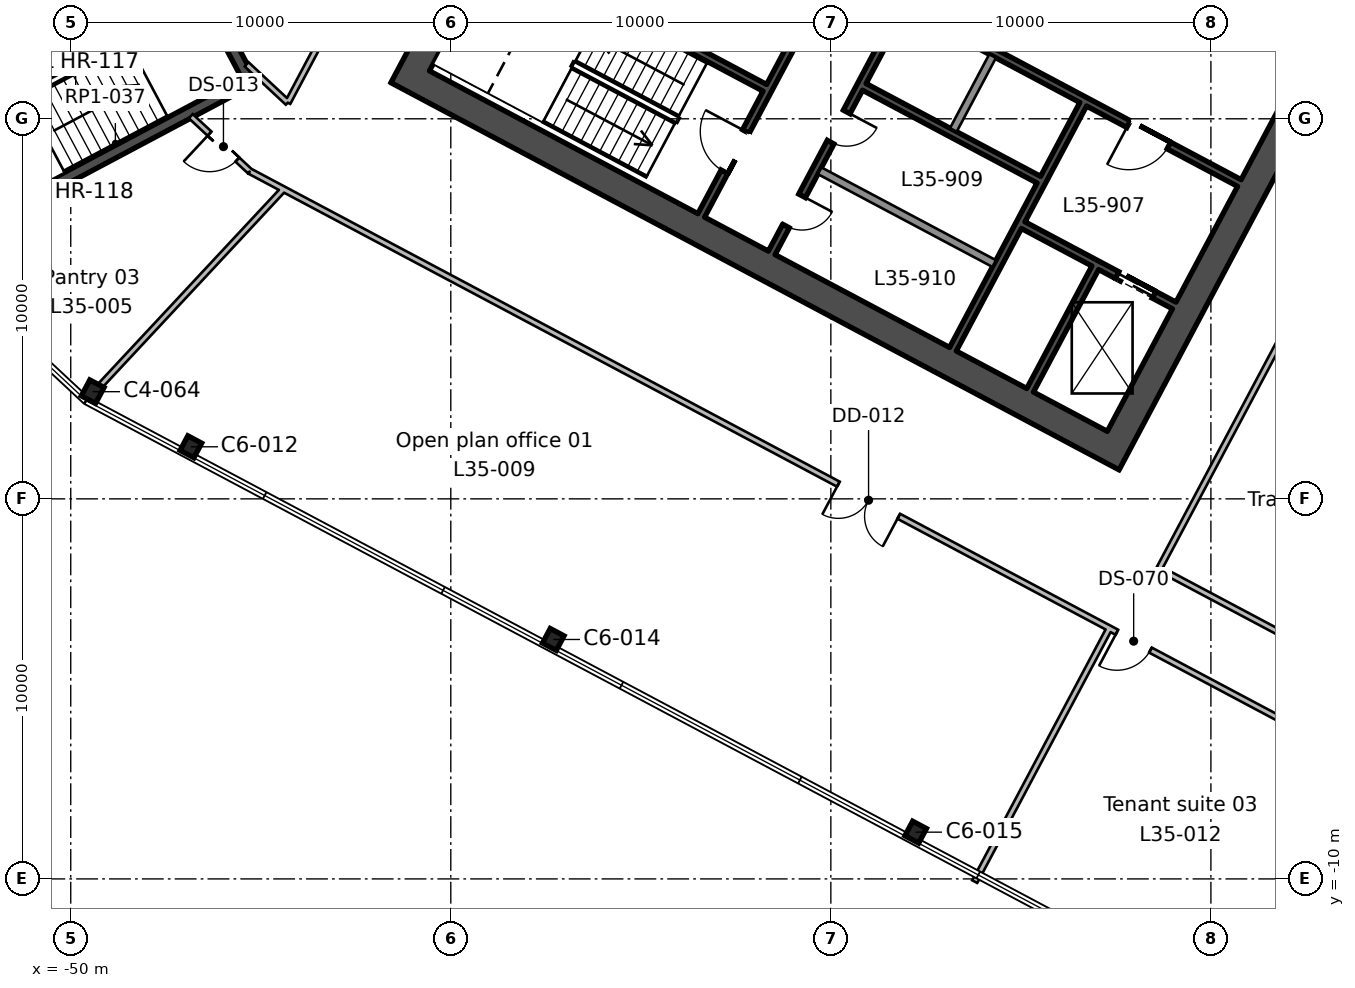
"""IFC4 building model, lengths in metres.
Left out: names, types, materials, properties, quantities, classifications, styles, units other than length and angle.
Written with IfcOpenShell. Run it as: python <this file> out.ifc"""

import sys

from ifc_helpers import new_model, si_unit, direction, frame, frame_2d, origin, origin_2d, place, context, subcontext, project, spatial, rectangle, i_section, extrude, element, fill, save


model = new_model("IFC4")
c1 = context("Model", 3, precision=1e-05, world=origin(), true_north=direction((0.0, 1.0)))
c2 = subcontext(c1, "Body", "Model", "MODEL_VIEW")
j1 = project(units=[si_unit("LENGTHUNIT", "METRE"), si_unit("PLANEANGLEUNIT", "RADIAN")], contexts=[c1])
p1 = place(None, origin())
s1 = spatial("IfcSite", under=j1, at=p1, CompositionType="ELEMENT")
p2 = place(p1, origin())
s2 = spatial("IfcBuilding", under=s1, at=p2, CompositionType="ELEMENT")
p3 = place(p2, frame((0.0, 0.0, 166.2)))
s3 = spatial("IfcBuildingStorey", under=s2, at=p3, CompositionType="ELEMENT", Elevation=166.2)
for number, where, z_axis, x_axis in (
    (1, (-27.768, -8.77, 0.0), (0.0, 0.0, 1.0), (0.883, -0.469, 0.0)),
    (2, (-37.304, -3.7, 0.0), (0.0, 0.0, 1.0), (0.883, -0.469, 0.0)),
    (3, (-46.839, 1.37, 0.0), (0.0, 0.0, 1.0), (0.883, -0.469, 0.0)),
):
    element("IfcColumn", number, at=place(p3, frame(where, z_axis=z_axis, x_axis=x_axis)), inside=s3, PredefinedType="COLUMN", context=c2, shape_type="SweptSolid", body=[
        extrude(i_section(OverallWidth=0.412, OverallDepth=0.434, WebThickness=0.036, FlangeThickness=0.057, FilletRadius=0.015, at=origin_2d()), origin(), (0.0, 0.0, 1.0), 4.0),
    ])
p4 = place(p3, frame((-49.423, 2.82, 0.0), z_axis=(0.0, 0.0, 1.0), x_axis=(0.882947592859, -0.469471562786, 0.0)))
e4 = element("IfcColumn", 4, at=p4, inside=s3, PredefinedType="COLUMN", context=c2, shape_type="SweptSolid", body=[
    extrude(i_section(OverallWidth=0.424, OverallDepth=0.475, WebThickness=0.048, FlangeThickness=0.077, FilletRadius=0.015, at=origin_2d()), origin(), (0.0, 0.0, 1.0), 4.0),
])
p5 = place(p3, frame((-13.498, 18.333, 0.0), z_axis=(0.0, 0.0, 1.0), x_axis=(-0.469469918705, -0.88294846703, 0.0)))
e5 = element("IfcWall", 5, at=p5, inside=s3, PredefinedType="SHEAR", context=c2, shape_type="SweptSolid", body=[
    extrude(rectangle(XDim=19.7, YDim=0.75, at=frame_2d((9.85, 0.0))), origin(), (0.0, 0.0, 1.0), 4.0),
])
p6 = place(p5, frame((6.85, 0.0, 0.0)))
e6 = element("IfcOpeningElement", 6, at=p6, cuts=e5, PredefinedType="OPENING", context=c2, shape_type="SweptSolid", body=[
    extrude(rectangle(XDim=2.4, YDim=2.4, at=frame_2d((1.2, 1.2))), frame((0.0, 0.385, 0.0), z_axis=(0.0, -1.0, 0.0), x_axis=(1.0, 0.0, 0.0)), (0.0, 0.0, 1.0), 0.77),
])
p7 = place(p3, frame((-31.996, 28.168, 0.0), z_axis=(0.0, 0.0, 1.0), x_axis=(-0.469479580143, -0.882943329908, 0.0)))
e7 = element("IfcWall", 7, at=p7, inside=s3, PredefinedType="SHEAR", context=c2, shape_type="SweptSolid", body=[
    extrude(rectangle(XDim=19.7, YDim=0.75, at=frame_2d((9.85, 0.0))), origin(), (0.0, 0.0, 1.0), 4.0),
])
p8 = place(p7, frame((10.45, 0.0, 0.0)))
e8 = element("IfcOpeningElement", 8, at=p8, cuts=e7, PredefinedType="OPENING", context=c2, shape_type="SweptSolid", body=[
    extrude(rectangle(XDim=2.4, YDim=2.4, at=frame_2d((1.2, 1.2))), frame((0.0, 0.385, 0.0), z_axis=(0.0, -1.0, 0.0), x_axis=(1.0, 0.0, 0.0)), (0.0, 0.0, 1.0), 0.77),
])
p9 = place(p3, frame((-22.902, 1.446, 0.0), z_axis=(0.0, 0.0, 1.0), x_axis=(-0.88294509198, 0.469476266226, 0.0)))
e9 = element("IfcWall", 9, at=p9, inside=s3, PredefinedType="SHEAR", context=c2, shape_type="SweptSolid", body=[
    extrude(rectangle(XDim=20.2, YDim=0.75, at=frame_2d((10.1, 0.0))), origin(), (0.0, 0.0, 1.0), 4.0),
])
p10 = place(p3, frame((-23.043, 6.08, 0.0), z_axis=(0.0, 0.0, 1.0), x_axis=(-0.469494272526, -0.882935517501, 0.0)))
e10 = element("IfcWall", 10, at=p10, inside=s3, PredefinedType="SHEAR", context=c2, shape_type="SweptSolid", body=[
    extrude(rectangle(XDim=3.65, YDim=0.2, at=frame_2d((1.825, 0.0))), origin(), (0.0, 0.0, 1.0), 4.0),
])
p11 = place(p3, frame((-23.36, 10.382, 0.0), z_axis=(0.0, 0.0, 1.0), x_axis=(-0.469480409012, -0.88294288918, 0.0)))
e11 = element("IfcWall", 11, at=p11, inside=s3, PredefinedType="SHEAR", context=c2, shape_type="SweptSolid", body=[
    extrude(rectangle(XDim=7.3, YDim=0.2, at=frame_2d((3.65, 0.0))), origin(), (0.0, 0.0, 1.0), 4.0),
])
p12 = place(p3, frame((-25.744, 11.65, 0.0), z_axis=(0.0, 0.0, 1.0), x_axis=(-0.469487830541, -0.882938942948, 0.0)))
e12 = element("IfcWall", 12, at=p12, inside=s3, PredefinedType="SOLIDWALL", context=c2, shape_type="SweptSolid", body=[
    extrude(rectangle(XDim=2.2, YDim=0.2, at=frame_2d((1.1, 0.0))), origin(), (0.0, 0.0, 1.0), 4.0),
])
p13 = place(p3, frame((-28.128, 12.917, 0.0), z_axis=(0.0, 0.0, 1.0), x_axis=(-0.469454336211, -0.882956752176, 0.0)))
e13 = element("IfcWall", 13, at=p13, inside=s3, PredefinedType="SHEAR", context=c2, shape_type="SweptSolid", body=[
    extrude(rectangle(XDim=7.3, YDim=0.2, at=frame_2d((3.65, 0.0))), origin(), (0.0, 0.0, 1.0), 4.0),
])
p14 = place(p13, frame((3.1, 0.0, 0.0)))
e14 = element("IfcOpeningElement", 14, at=p14, cuts=e13, PredefinedType="OPENING", context=c2, shape_type="SweptSolid", body=[
    extrude(rectangle(XDim=0.9, YDim=2.1, at=frame_2d((0.45, 1.05))), frame((0.0, 0.11, 0.0), z_axis=(0.0, -1.0, 0.0), x_axis=(1.0, 0.0, 0.0)), (0.0, 0.0, 1.0), 0.22),
])
p15 = place(p13, frame((5.6, 0.0, 0.0)))
e15 = element("IfcOpeningElement", 15, at=p15, cuts=e13, PredefinedType="OPENING", context=c2, shape_type="SweptSolid", body=[
    extrude(rectangle(XDim=0.9, YDim=2.1, at=frame_2d((0.45, 1.05))), frame((0.0, 0.11, 0.0), z_axis=(0.0, -1.0, 0.0), x_axis=(1.0, 0.0, 0.0)), (0.0, 0.0, 1.0), 0.22),
])
p16 = place(p3, frame((-29.982, 13.903, 0.0), z_axis=(0.0, 0.0, 1.0), x_axis=(-0.469454336211, -0.882956752176, 0.0)))
e16 = element("IfcWall", 16, at=p16, inside=s3, PredefinedType="SHEAR", context=c2, shape_type="SweptSolid", body=[
    extrude(rectangle(XDim=7.3, YDim=0.2, at=frame_2d((3.65, 0.0))), origin(), (0.0, 0.0, 1.0), 4.0),
])
p17 = place(p16, frame((4.8, 0.0, 0.0)))
e17 = element("IfcOpeningElement", 17, at=p17, cuts=e16, PredefinedType="OPENING", context=c2, shape_type="SweptSolid", body=[
    extrude(rectangle(XDim=1.2, YDim=2.1, at=frame_2d((0.6, 1.05))), frame((0.0, 0.11, 0.0), z_axis=(0.0, -1.0, 0.0), x_axis=(1.0, 0.0, 0.0)), (0.0, 0.0, 1.0), 0.22),
])
p18 = place(p3, frame((-19.252, 8.311, 0.0), z_axis=(0.0, 0.0, 1.0), x_axis=(-0.882955722218, 0.469456273365, 0.0)))
e18 = element("IfcWall", 18, at=p18, inside=s3, PredefinedType="SHEAR", context=c2, shape_type="SweptSolid", body=[
    extrude(rectangle(XDim=10.0, YDim=0.2, at=frame_2d((5.0, 0.0))), origin(), (0.0, 0.0, 1.0), 4.0),
])
p19 = place(p18, frame((2.1, 0.0, 0.0)))
e19 = element("IfcOpeningElement", 19, at=p19, cuts=e18, PredefinedType="OPENING", context=c2, shape_type="SweptSolid", body=[
    extrude(rectangle(XDim=1.2, YDim=2.1, at=frame_2d((0.6, 1.05))), frame((0.0, 0.11, 0.0), z_axis=(0.0, -1.0, 0.0), x_axis=(1.0, 0.0, 0.0)), (0.0, 0.0, 1.0), 0.22),
])
p20 = place(p3, frame((-24.528, 8.398, 0.0), z_axis=(0.0, 0.0, 1.0), x_axis=(-0.882953967957, 0.469459572775, 0.0)))
e20 = element("IfcWall", 20, at=p20, inside=s3, PredefinedType="SHEAR", context=c2, shape_type="SweptSolid", body=[
    extrude(rectangle(XDim=5.2, YDim=0.2, at=frame_2d((2.6, 0.0))), origin(), (0.0, 0.0, 1.0), 4.0),
])
p21 = place(p3, frame((-20.965, 5.088, 0.0), z_axis=(0.0, 0.0, 1.0), x_axis=(-0.882925986334, 0.469512196493, 0.0)))
e21 = element("IfcWall", 21, at=p21, inside=s3, PredefinedType="SHEAR", context=c2, shape_type="SweptSolid", body=[
    extrude(rectangle(XDim=4.5, YDim=0.2, at=frame_2d((2.25, 0.0))), origin(), (0.0, 0.0, 1.0), 4.0),
])
p22 = place(p21, frame((0.6, 0.0, 0.0)))
e22 = element("IfcOpeningElement", 22, at=p22, cuts=e21, PredefinedType="OPENING", context=c2, shape_type="SweptSolid", body=[
    extrude(rectangle(XDim=1.1, YDim=2.1, at=frame_2d((0.55, 1.05))), frame((0.0, 0.11, 0.0), z_axis=(0.0, -1.0, 0.0), x_axis=(1.0, 0.0, 0.0)), (0.0, 0.0, 1.0), 0.22),
])
p23 = place(p3, frame((-31.737, 10.816, 0.0), z_axis=(0.0, 0.0, 1.0), x_axis=(-0.882940221191, 0.469485426614, 0.0)))
e23 = element("IfcWall", 23, at=p23, inside=s3, PredefinedType="SHEAR", context=c2, shape_type="SweptSolid", body=[
    extrude(rectangle(XDim=8.0, YDim=0.2, at=frame_2d((4.0, 0.0))), origin(), (0.0, 0.0, 1.0), 4.0),
])
p24 = place(p3, frame((-25.702, 6.191, 0.0), z_axis=(0.0, 0.0, 1.0), x_axis=(-0.882934506056, 0.469496174655, 0.0)))
e24 = element("IfcWall", 24, at=p24, inside=s3, PredefinedType="SOLIDWALL", context=c2, shape_type="SweptSolid", body=[
    extrude(rectangle(XDim=5.2, YDim=0.2, at=frame_2d((2.6, 0.0))), origin(), (0.0, 0.0, 1.0), 4.0),
])
p25 = place(p3, frame((-47.574, 15.29, 0.0), z_axis=(0.0, 0.0, 1.0), x_axis=(0.469443498566, -0.882962514297, 0.0)))
e25 = element("IfcWall", 25, at=p25, inside=s3, PredefinedType="SHEAR", context=c2, shape_type="SweptSolid", body=[
    extrude(rectangle(XDim=4.85, YDim=0.3, at=frame_2d((2.425, 0.0))), origin(), (0.0, 0.0, 1.0), 4.0),
])
p26 = place(p3, frame((-45.297, 11.007, 0.0), z_axis=(0.0, 0.0, 1.0), x_axis=(-0.882951519127, -0.469464178475, 0.0)))
e26 = element("IfcWall", 26, at=p26, inside=s3, PredefinedType="SHEAR", context=c2, shape_type="SweptSolid", body=[
    extrude(rectangle(XDim=8.3, YDim=0.3, at=frame_2d((4.15, 0.0))), origin(), (0.0, 0.0, 1.0), 4.0),
])
p27 = place(p3, frame((-54.903, 11.393, 0.0), z_axis=(0.0, 0.0, 1.0), x_axis=(0.882939326045, 0.469487110071, 0.0)))
e27 = element("IfcWall", 27, at=p27, inside=s3, PredefinedType="SHEAR", context=c2, shape_type="SweptSolid", body=[
    extrude(rectangle(XDim=8.3, YDim=0.3, at=frame_2d((4.15, 0.0))), origin(), (0.0, 0.0, 1.0), 4.0),
])
p28 = place(p27, frame((6.05, 0.0, 0.0)))
e28 = element("IfcOpeningElement", 28, at=p28, cuts=e27, PredefinedType="OPENING", context=c2, shape_type="SweptSolid", body=[
    extrude(rectangle(XDim=1.9, YDim=2.1, at=frame_2d((0.95, 1.05))), frame((0.0, 0.16, 0.0), z_axis=(0.0, -1.0, 0.0), x_axis=(1.0, 0.0, 0.0)), (0.0, 0.0, 1.0), 0.32),
])
p29 = place(p3, frame((-44.402, 8.149, 0.0), z_axis=(0.0, 0.0, 1.0), x_axis=(-0.682039957921, -0.731314908777, 0.0)))
e29 = element("IfcWall", 29, at=p29, inside=s3, PredefinedType="PARTITIONING", context=c2, shape_type="SweptSolid", body=[
    extrude(rectangle(XDim=7.065, YDim=0.15, at=frame_2d((3.533, 0.0))), origin(), (0.0, 0.0, 1.0), 3.64),
])
p30 = place(p3, frame((-22.67, -3.406, 0.0), z_axis=(0.0, 0.0, 1.0), x_axis=(-0.469451537303, -0.882958240306, 0.0)))
e30 = element("IfcWall", 30, at=p30, inside=s3, PredefinedType="PARTITIONING", context=c2, shape_type="SweptSolid", body=[
    extrude(rectangle(XDim=7.55, YDim=0.15, at=frame_2d((3.775, 0.0))), origin(), (0.0, 0.0, 1.0), 3.64),
])
p31 = place(p3, frame((-33.409, 30.888, 0.0), z_axis=(0.0, 0.0, 1.0), x_axis=(-0.469498189487, -0.882933434676, 0.0)))
e31 = element("IfcWall", 31, at=p31, inside=s3, PredefinedType="PARTITIONING", context=c2, shape_type="SweptSolid", body=[
    extrude(rectangle(XDim=23.176, YDim=0.15, at=frame_2d((11.588, 0.0))), origin(), (0.0, 0.0, 1.0), 3.64),
])
p32 = place(p3, frame((-44.29, 10.425, 0.0), z_axis=(0.0, 0.0, 1.0), x_axis=(-0.731652828982, 0.681677444135, 0.0)))
e32 = element("IfcWall", 32, at=p32, inside=s3, PredefinedType="PARTITIONING", context=c2, shape_type="SweptSolid", body=[
    extrude(rectangle(XDim=1.48, YDim=0.15, at=frame_2d((0.74, 0.0))), origin(), (0.0, 0.0, 1.0), 3.64),
])
p33 = place(p3, frame((-44.462, 8.181, 0.0), z_axis=(0.0, 0.0, 1.0), x_axis=(-0.882750253305, 0.469842516478, 0.0)))
e33 = element("IfcWall", 33, at=p33, inside=s3, PredefinedType="PARTITIONING", context=c2, shape_type="SweptSolid", body=[
    extrude(rectangle(XDim=0.935, YDim=0.15, at=frame_2d((0.467, 0.0))), origin(), (0.0, 0.0, 1.0), 3.64),
])
p34 = place(p3, frame((-45.287, 8.62, 0.0), z_axis=(0.0, 0.0, 1.0), x_axis=(-0.731593637228, 0.681740969846, 0.0)))
e34 = element("IfcWall", 34, at=p34, inside=s3, PredefinedType="PARTITIONING", context=c2, shape_type="SweptSolid", body=[
    extrude(rectangle(XDim=2.125, YDim=0.15, at=frame_2d((1.063, 0.0))), origin(), (0.0, 0.0, 1.0), 3.64),
])
p35 = place(p34, frame((0.45, 0.0, 0.0)))
e35 = element("IfcOpeningElement", 35, at=p35, cuts=e34, PredefinedType="OPENING", context=c2, shape_type="SweptSolid", body=[
    extrude(rectangle(XDim=1.0, YDim=2.1, at=frame_2d((0.5, 1.05))), frame((0.0, 0.085, 0.0), z_axis=(0.0, -1.0, 0.0), x_axis=(1.0, 0.0, 0.0)), (0.0, 0.0, 1.0), 0.17),
])
p36 = place(p3, frame((-13.6, -8.228, 0.0), z_axis=(0.0, 0.0, 1.0), x_axis=(-0.882954510497, 0.469458552369, 0.0)))
e36 = element("IfcWall", 36, at=p36, inside=s3, PredefinedType="PARTITIONING", context=c2, shape_type="SweptSolid", body=[
    extrude(rectangle(XDim=34.953, YDim=0.15, at=frame_2d((17.477, 0.0))), origin(), (0.0, 0.0, 1.0), 3.64),
])
p37 = place(p36, frame((16.55, 0.0, 0.0)))
e37 = element("IfcOpeningElement", 37, at=p37, cuts=e36, PredefinedType="OPENING", context=c2, shape_type="SweptSolid", body=[
    extrude(rectangle(XDim=1.8, YDim=2.1, at=frame_2d((0.9, 1.05))), frame((0.0, 0.085, 0.0), z_axis=(0.0, -1.0, 0.0), x_axis=(1.0, 0.0, 0.0)), (0.0, 0.0, 1.0), 0.17),
])
p38 = place(p36, frame((9.05, 0.0, 0.0)))
e38 = element("IfcOpeningElement", 38, at=p38, cuts=e36, PredefinedType="OPENING", context=c2, shape_type="SweptSolid", body=[
    extrude(rectangle(XDim=1.0, YDim=2.1, at=frame_2d((0.5, 1.05))), frame((0.0, 0.085, 0.0), z_axis=(0.0, -1.0, 0.0), x_axis=(1.0, 0.0, 0.0)), (0.0, 0.0, 1.0), 0.17),
])
p39 = place(p3, frame((-21.362, -1.836, 0.0), z_axis=(0.0, 0.0, 1.0), x_axis=(0.469442492633, 0.88296304912, 0.0)))
e39 = element("IfcWall", 39, at=p39, inside=s3, PredefinedType="PARTITIONING", context=c2, shape_type="SweptSolid", body=[
    extrude(rectangle(XDim=23.3, YDim=0.15, at=frame_2d((11.65, 0.0))), origin(), (0.0, 0.0, 1.0), 3.64),
])
p40 = place(p39, frame((11.15, 0.0, 0.0)))
e40 = element("IfcOpeningElement", 40, at=p40, cuts=e39, PredefinedType="OPENING", context=c2, shape_type="SweptSolid", body=[
    extrude(rectangle(XDim=1.0, YDim=2.1, at=frame_2d((0.5, 1.05))), frame((0.0, 0.085, 0.0), z_axis=(0.0, -1.0, 0.0), x_axis=(1.0, 0.0, 0.0)), (0.0, 0.0, 1.0), 0.17),
])
p41 = place(p3, frame((-13.6, -5.963, 0.0), z_axis=(0.0, 0.0, 1.0), x_axis=(-0.882954936964, 0.469457750273, 0.0)))
e41 = element("IfcWall", 41, at=p41, inside=s3, PredefinedType="PARTITIONING", context=c2, shape_type="SweptSolid", body=[
    extrude(rectangle(XDim=8.791, YDim=0.15, at=frame_2d((4.396, 0.0))), origin(), (0.0, 0.0, 1.0), 3.64),
])
p42 = place(p19, origin())
e42 = element("IfcDoor", 42, at=p42, inside=s3, OperationType="SINGLE_SWING_RIGHT", PredefinedType="DOOR", context=c2, shape_type="SweptSolid", body=[
    extrude(rectangle(XDim=1.2, YDim=2.1, at=frame_2d((0.6, 1.05))), frame((0.0, 0.025, 0.0), z_axis=(0.0, -1.0, 0.0), x_axis=(1.0, 0.0, 0.0)), (0.0, 0.0, 1.0), 0.05),
])
fill(e19, e42)
p43 = place(p17, frame((1.2, 0.0, 0.0), z_axis=(0.0, 0.0, 1.0), x_axis=(-1.0, 0.0, 0.0)))
e43 = element("IfcDoor", 43, at=p43, inside=s3, OperationType="SINGLE_SWING_RIGHT", PredefinedType="DOOR", context=c2, shape_type="SweptSolid", body=[
    extrude(rectangle(XDim=1.2, YDim=2.1, at=frame_2d((0.6, 1.05))), frame((0.0, 0.025, 0.0), z_axis=(0.0, -1.0, 0.0), x_axis=(1.0, 0.0, 0.0)), (0.0, 0.0, 1.0), 0.05),
])
fill(e17, e43)
p44 = place(p22, origin())
e44 = element("IfcDoor", 44, at=p44, inside=s3, OperationType="DOUBLE_DOOR_SLIDING", PredefinedType="DOOR", context=c2, shape_type="SweptSolid", body=[
    extrude(rectangle(XDim=1.1, YDim=2.1, at=frame_2d((0.55, 1.05))), frame((0.0, 0.025, 0.0), z_axis=(0.0, -1.0, 0.0), x_axis=(1.0, 0.0, 0.0)), (0.0, 0.0, 1.0), 0.05),
])
fill(e22, e44)
p45 = place(p14, origin())
e45 = element("IfcDoor", 45, at=p45, inside=s3, OperationType="SINGLE_SWING_LEFT", PredefinedType="DOOR", context=c2, shape_type="SweptSolid", body=[
    extrude(rectangle(XDim=0.9, YDim=2.1, at=frame_2d((0.45, 1.05))), frame((0.0, 0.025, 0.0), z_axis=(0.0, -1.0, 0.0), x_axis=(1.0, 0.0, 0.0)), (0.0, 0.0, 1.0), 0.05),
])
fill(e14, e45)
p46 = place(p15, origin())
e46 = element("IfcDoor", 46, at=p46, inside=s3, OperationType="SINGLE_SWING_LEFT", PredefinedType="DOOR", context=c2, shape_type="SweptSolid", body=[
    extrude(rectangle(XDim=0.9, YDim=2.1, at=frame_2d((0.45, 1.05))), frame((0.0, 0.025, 0.0), z_axis=(0.0, -1.0, 0.0), x_axis=(1.0, 0.0, 0.0)), (0.0, 0.0, 1.0), 0.05),
])
fill(e15, e46)
p47 = place(p35, origin())
e47 = element("IfcDoor", 47, at=p47, inside=s3, OperationType="SINGLE_SWING_RIGHT", PredefinedType="DOOR", context=c2, shape_type="SweptSolid", body=[
    extrude(rectangle(XDim=1.0, YDim=2.1, at=frame_2d((0.5, 1.05))), frame((0.0, 0.025, 0.0), z_axis=(0.0, -1.0, 0.0), x_axis=(1.0, 0.0, 0.0)), (0.0, 0.0, 1.0), 0.05),
])
fill(e35, e47)
p48 = place(p37, origin())
e48 = element("IfcDoor", 48, at=p48, inside=s3, OperationType="DOUBLE_DOOR_SINGLE_SWING", PredefinedType="DOOR", context=c2, shape_type="SweptSolid", body=[
    extrude(rectangle(XDim=1.8, YDim=2.1, at=frame_2d((0.9, 1.05))), frame((0.0, 0.025, 0.0), z_axis=(0.0, -1.0, 0.0), x_axis=(1.0, 0.0, 0.0)), (0.0, 0.0, 1.0), 0.05),
])
fill(e37, e48)
p49 = place(p38, origin())
e49 = element("IfcDoor", 49, at=p49, inside=s3, OperationType="SINGLE_SWING_RIGHT", PredefinedType="DOOR", context=c2, shape_type="SweptSolid", body=[
    extrude(rectangle(XDim=1.0, YDim=2.1, at=frame_2d((0.5, 1.05))), frame((0.0, 0.025, 0.0), z_axis=(0.0, -1.0, 0.0), x_axis=(1.0, 0.0, 0.0)), (0.0, 0.0, 1.0), 0.05),
])
fill(e38, e49)
save(model, sys.argv[1])
